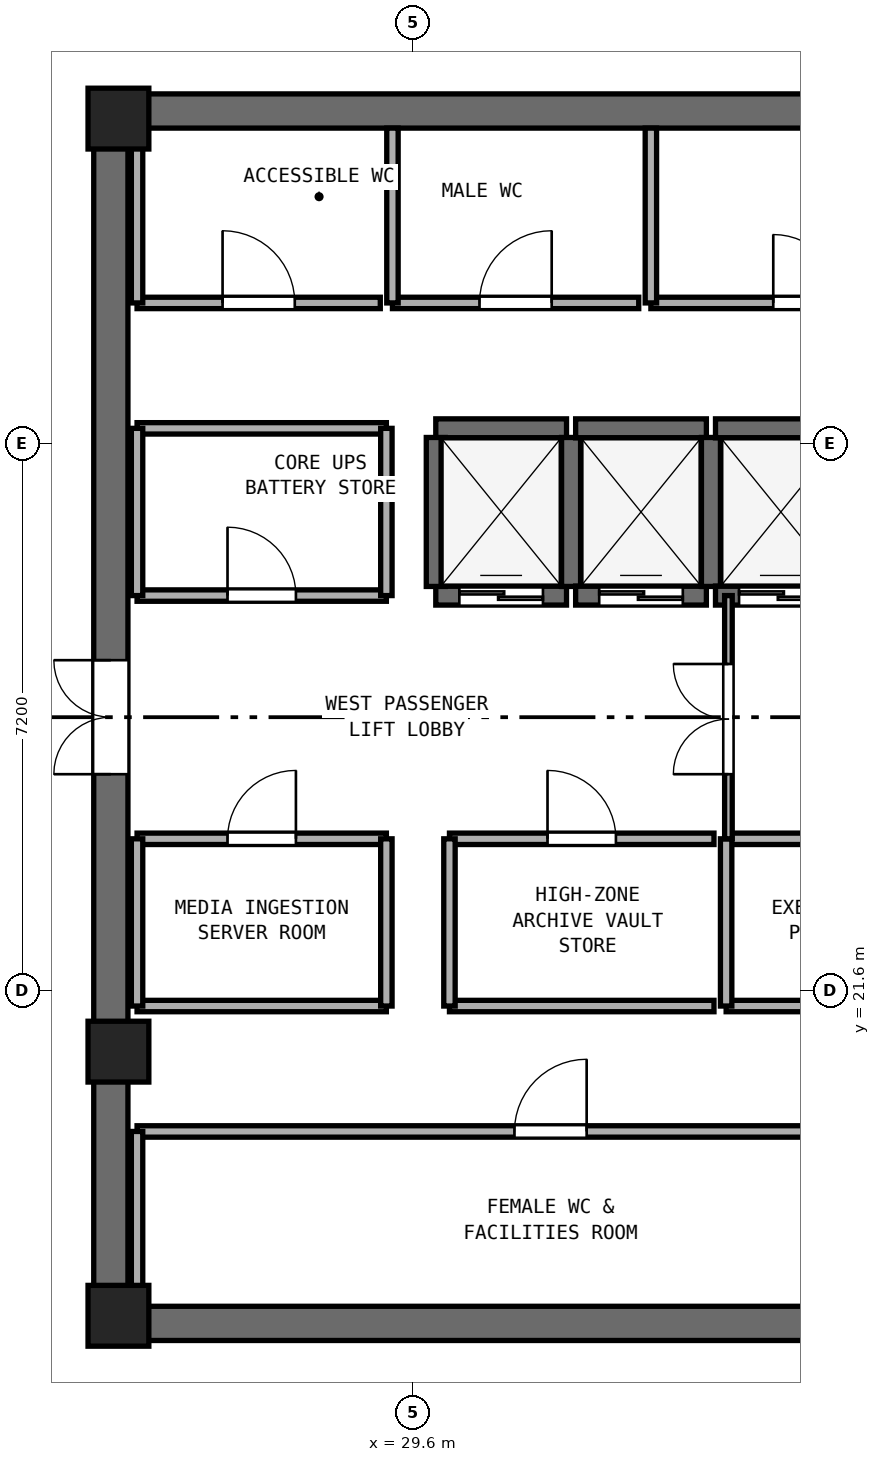
"""IFC4 building model, lengths in metres.
Left out: names, types, materials, properties, quantities, classifications, styles, units other than length and angle.
Written with IfcOpenShell. Run it as: python <this file> out.ifc"""

import sys

from ifc_helpers import new_model, si_unit, direction, frame, frame_2d, origin, origin_2d, place, context, subcontext, project, spatial, rectangle, extrude, element, fill, save


model = new_model("IFC4")
c1 = context("Model", 3, precision=1e-05, world=origin(), true_north=direction((0.0, 1.0)))
c2 = subcontext(c1, "Body", "Model", "MODEL_VIEW")
j1 = project(units=[si_unit("LENGTHUNIT", "METRE"), si_unit("PLANEANGLEUNIT", "RADIAN")], contexts=[c1])
p1 = place(None, origin())
s1 = spatial("IfcSite", under=j1, at=p1, CompositionType="ELEMENT")
p2 = place(p1, origin())
s2 = spatial("IfcBuilding", under=s1, at=p2, CompositionType="ELEMENT")
p3 = place(p2, frame((0.0, 0.0, 244.0)))
s3 = spatial("IfcBuildingStorey", under=s2, at=p3, CompositionType="ELEMENT", Elevation=244.0)
for number, where, z_axis, x_axis in (
    (1, (25.4, 17.225, 0.0), (0.0, 0.0, 1.0), (1.0, 0.0, 0.0)),
    (2, (25.4, 33.175, 0.0), (0.0, 0.0, 1.0), (1.0, 0.0, 0.0)),
):
    element("IfcWall", number, at=place(p3, frame(where, z_axis=z_axis, x_axis=x_axis)), inside=s3, PredefinedType="SHEAR", context=c2, shape_type="SweptSolid", body=[
        extrude(rectangle(XDim=23.2, YDim=0.45, at=frame_2d((11.6, 0.0))), origin(), (0.0, 0.0, 1.0), 3.51),
    ])
p4 = place(p3, frame((25.625, 17.45, 0.0), z_axis=(0.0, 0.0, 1.0), x_axis=(0.0, 1.0, 0.0)))
e3 = element("IfcWall", 3, at=p4, inside=s3, PredefinedType="SHEAR", context=c2, shape_type="SweptSolid", body=[
    extrude(rectangle(XDim=15.5, YDim=0.45, at=frame_2d((7.75, 0.0))), origin(), (0.0, 0.0, 1.0), 3.51),
])
p5 = place(p4, frame((7.0, 0.0, 0.0)))
e4 = element("IfcOpeningElement", 4, at=p5, cuts=e3, PredefinedType="OPENING", context=c2, shape_type="SweptSolid", body=[
    extrude(rectangle(XDim=1.5, YDim=2.15, at=frame_2d((0.75, 1.075))), frame((0.0, 0.235, 0.0), z_axis=(0.0, -1.0, 0.0), x_axis=(1.0, 0.0, 0.0)), (0.0, 0.0, 1.0), 0.47),
])
for number, where, z_axis, x_axis in (
    (5, (25.725, 17.325, 0.0), (0.0, 0.0, 1.0), (1.0, 0.0, 0.0)),
    (6, (25.725, 33.075, 0.0), (0.0, 0.0, 1.0), (1.0, 0.0, 0.0)),
    (7, (25.725, 20.8, 0.0), (0.0, 0.0, 1.0), (1.0, 0.0, 0.0)),
):
    element("IfcColumn", number, at=place(p3, frame(where, z_axis=z_axis, x_axis=x_axis)), inside=s3, PredefinedType="PILASTER", context=c2, shape_type="SweptSolid", body=[
        extrude(rectangle(XDim=0.8, YDim=0.8, at=origin_2d()), origin(), (0.0, 0.0, 1.0), 3.8),
    ])
p6 = place(p3, frame((29.9, 26.8, 0.0), z_axis=(0.0, 0.0, 1.0), x_axis=(1.0, 0.0, 0.0)))
e8 = element("IfcWall", 8, at=p6, inside=s3, PredefinedType="SHEAR", context=c2, shape_type="SweptSolid", body=[
    extrude(rectangle(XDim=1.72, YDim=0.25, at=frame_2d((0.86, 0.0))), origin(), (0.0, 0.0, 1.0), 3.51),
])
p7 = place(p6, frame((0.31, 0.0, 0.0)))
e9 = element("IfcOpeningElement", 9, at=p7, cuts=e8, PredefinedType="OPENING", context=c2, shape_type="SweptSolid", body=[
    extrude(rectangle(XDim=1.1, YDim=2.15, at=frame_2d((0.55, 1.075))), frame((0.0, 0.135, 0.0), z_axis=(0.0, -1.0, 0.0), x_axis=(1.0, 0.0, 0.0)), (0.0, 0.0, 1.0), 0.27),
])
p8 = place(p3, frame((29.9, 29.0, 0.0), z_axis=(0.0, 0.0, 1.0), x_axis=(1.0, 0.0, 0.0)))
e10 = element("IfcWall", 10, at=p8, inside=s3, PredefinedType="SHEAR", context=c2, shape_type="SweptSolid", body=[
    extrude(rectangle(XDim=1.72, YDim=0.25, at=frame_2d((0.86, 0.0))), origin(), (0.0, 0.0, 1.0), 3.51),
])
for number, where, z_axis, x_axis in (
    (11, (29.9, 26.92, 0.0), (0.0, 0.0, 1.0), (0.0, 1.0, 0.0)),
    (12, (31.68, 26.92, 0.0), (0.0, 0.0, 1.0), (0.0, 1.0, 0.0)),
):
    element("IfcWall", number, at=place(p3, frame(where, z_axis=z_axis, x_axis=x_axis)), inside=s3, PredefinedType="SHEAR", context=c2, shape_type="SweptSolid", body=[
        extrude(rectangle(XDim=1.96, YDim=0.25, at=frame_2d((0.98, 0.0))), origin(), (0.0, 0.0, 1.0), 3.51),
    ])
p9 = place(p3, frame((31.74, 26.8, 0.0), z_axis=(0.0, 0.0, 1.0), x_axis=(1.0, 0.0, 0.0)))
e13 = element("IfcWall", 13, at=p9, inside=s3, PredefinedType="SHEAR", context=c2, shape_type="SweptSolid", body=[
    extrude(rectangle(XDim=1.72, YDim=0.25, at=frame_2d((0.86, 0.0))), origin(), (0.0, 0.0, 1.0), 3.51),
])
p10 = place(p9, frame((0.31, 0.0, 0.0)))
e14 = element("IfcOpeningElement", 14, at=p10, cuts=e13, PredefinedType="OPENING", context=c2, shape_type="SweptSolid", body=[
    extrude(rectangle(XDim=1.1, YDim=2.15, at=frame_2d((0.55, 1.075))), frame((0.0, 0.135, 0.0), z_axis=(0.0, -1.0, 0.0), x_axis=(1.0, 0.0, 0.0)), (0.0, 0.0, 1.0), 0.27),
])
p11 = place(p3, frame((31.74, 29.0, 0.0), z_axis=(0.0, 0.0, 1.0), x_axis=(1.0, 0.0, 0.0)))
e15 = element("IfcWall", 15, at=p11, inside=s3, PredefinedType="SHEAR", context=c2, shape_type="SweptSolid", body=[
    extrude(rectangle(XDim=1.72, YDim=0.25, at=frame_2d((0.86, 0.0))), origin(), (0.0, 0.0, 1.0), 3.51),
])
p12 = place(p3, frame((33.52, 26.92, 0.0), z_axis=(0.0, 0.0, 1.0), x_axis=(0.0, 1.0, 0.0)))
e16 = element("IfcWall", 16, at=p12, inside=s3, PredefinedType="SHEAR", context=c2, shape_type="SweptSolid", body=[
    extrude(rectangle(XDim=1.96, YDim=0.25, at=frame_2d((0.98, 0.0))), origin(), (0.0, 0.0, 1.0), 3.51),
])
p13 = place(p3, frame((33.58, 26.8, 0.0), z_axis=(0.0, 0.0, 1.0), x_axis=(1.0, 0.0, 0.0)))
e17 = element("IfcWall", 17, at=p13, inside=s3, PredefinedType="SHEAR", context=c2, shape_type="SweptSolid", body=[
    extrude(rectangle(XDim=1.72, YDim=0.25, at=frame_2d((0.86, 0.0))), origin(), (0.0, 0.0, 1.0), 3.51),
])
p14 = place(p13, frame((0.31, 0.0, 0.0)))
e18 = element("IfcOpeningElement", 18, at=p14, cuts=e17, PredefinedType="OPENING", context=c2, shape_type="SweptSolid", body=[
    extrude(rectangle(XDim=1.1, YDim=2.15, at=frame_2d((0.55, 1.075))), frame((0.0, 0.135, 0.0), z_axis=(0.0, -1.0, 0.0), x_axis=(1.0, 0.0, 0.0)), (0.0, 0.0, 1.0), 0.27),
])
p15 = place(p3, frame((33.58, 29.0, 0.0), z_axis=(0.0, 0.0, 1.0), x_axis=(1.0, 0.0, 0.0)))
e19 = element("IfcWall", 19, at=p15, inside=s3, PredefinedType="SHEAR", context=c2, shape_type="SweptSolid", body=[
    extrude(rectangle(XDim=1.72, YDim=0.25, at=frame_2d((0.86, 0.0))), origin(), (0.0, 0.0, 1.0), 3.51),
])
p16 = place(p3, frame((25.97, 30.65, 0.0), z_axis=(0.0, 0.0, 1.0), x_axis=(1.0, 0.0, 0.0)))
e20 = element("IfcWall", 20, at=p16, inside=s3, PredefinedType="PARTITIONING", context=c2, shape_type="SweptSolid", body=[
    extrude(rectangle(XDim=3.2, YDim=0.15, at=frame_2d((1.6, 0.0))), origin(), (0.0, 0.0, 1.0), 3.51),
])
p17 = place(p16, frame((1.125, 0.0, 0.0)))
e21 = element("IfcOpeningElement", 21, at=p17, cuts=e20, PredefinedType="OPENING", context=c2, shape_type="SweptSolid", body=[
    extrude(rectangle(XDim=0.95, YDim=2.1, at=frame_2d((0.475, 1.05))), frame((0.0, 0.085, 0.0), z_axis=(0.0, -1.0, 0.0), x_axis=(1.0, 0.0, 0.0)), (0.0, 0.0, 1.0), 0.17),
])
p18 = place(p3, frame((25.97, 30.65, 0.0), z_axis=(0.0, 0.0, 1.0), x_axis=(0.0, 1.0, 0.0)))
e22 = element("IfcWall", 22, at=p18, inside=s3, PredefinedType="PARTITIONING", context=c2, shape_type="SweptSolid", body=[
    extrude(rectangle(XDim=2.3, YDim=0.15, at=frame_2d((1.15, 0.0))), origin(), (0.0, 0.0, 1.0), 2.61),
])
p19 = place(p3, frame((29.33, 30.65, 0.0), z_axis=(0.0, 0.0, 1.0), x_axis=(1.0, 0.0, 0.0)))
e23 = element("IfcWall", 23, at=p19, inside=s3, PredefinedType="PARTITIONING", context=c2, shape_type="SweptSolid", body=[
    extrude(rectangle(XDim=3.24, YDim=0.15, at=frame_2d((1.62, 0.0))), origin(), (0.0, 0.0, 1.0), 3.51),
])
p20 = place(p19, frame((1.145, 0.0, 0.0)))
e24 = element("IfcOpeningElement", 24, at=p20, cuts=e23, PredefinedType="OPENING", context=c2, shape_type="SweptSolid", body=[
    extrude(rectangle(XDim=0.95, YDim=2.1, at=frame_2d((0.475, 1.05))), frame((0.0, 0.085, 0.0), z_axis=(0.0, -1.0, 0.0), x_axis=(1.0, 0.0, 0.0)), (0.0, 0.0, 1.0), 0.17),
])
p21 = place(p3, frame((29.33, 30.65, 0.0), z_axis=(0.0, 0.0, 1.0), x_axis=(0.0, 1.0, 0.0)))
e25 = element("IfcWall", 25, at=p21, inside=s3, PredefinedType="PARTITIONING", context=c2, shape_type="SweptSolid", body=[
    extrude(rectangle(XDim=2.3, YDim=0.15, at=frame_2d((1.15, 0.0))), origin(), (0.0, 0.0, 1.0), 3.51),
])
p22 = place(p3, frame((32.73, 30.65, 0.0), z_axis=(0.0, 0.0, 1.0), x_axis=(1.0, 0.0, 0.0)))
e26 = element("IfcWall", 26, at=p22, inside=s3, PredefinedType="PARTITIONING", context=c2, shape_type="SweptSolid", body=[
    extrude(rectangle(XDim=4.12, YDim=0.15, at=frame_2d((2.06, 0.0))), origin(), (0.0, 0.0, 1.0), 3.51),
])
p23 = place(p22, frame((1.61, 0.0, 0.0)))
e27 = element("IfcOpeningElement", 27, at=p23, cuts=e26, PredefinedType="OPENING", context=c2, shape_type="SweptSolid", body=[
    extrude(rectangle(XDim=0.9, YDim=2.1, at=frame_2d((0.45, 1.05))), frame((0.0, 0.085, 0.0), z_axis=(0.0, -1.0, 0.0), x_axis=(1.0, 0.0, 0.0)), (0.0, 0.0, 1.0), 0.17),
])
p24 = place(p3, frame((32.73, 30.65, 0.0), z_axis=(0.0, 0.0, 1.0), x_axis=(0.0, 1.0, 0.0)))
e28 = element("IfcWall", 28, at=p24, inside=s3, PredefinedType="PARTITIONING", context=c2, shape_type="SweptSolid", body=[
    extrude(rectangle(XDim=2.3, YDim=0.15, at=frame_2d((1.15, 0.0))), origin(), (0.0, 0.0, 1.0), 3.51),
])
p25 = place(p3, frame((25.97, 19.75, 0.0), z_axis=(0.0, 0.0, 1.0), x_axis=(1.0, 0.0, 0.0)))
e29 = element("IfcWall", 29, at=p25, inside=s3, PredefinedType="PARTITIONING", context=c2, shape_type="SweptSolid", body=[
    extrude(rectangle(XDim=10.88, YDim=0.15, at=frame_2d((5.44, 0.0))), origin(), (0.0, 0.0, 1.0), 3.51),
])
p26 = place(p25, frame((4.965, 0.0, 0.0)))
e30 = element("IfcOpeningElement", 30, at=p26, cuts=e29, PredefinedType="OPENING", context=c2, shape_type="SweptSolid", body=[
    extrude(rectangle(XDim=0.95, YDim=2.1, at=frame_2d((0.475, 1.05))), frame((0.0, 0.085, 0.0), z_axis=(0.0, -1.0, 0.0), x_axis=(1.0, 0.0, 0.0)), (0.0, 0.0, 1.0), 0.17),
])
p27 = place(p3, frame((25.97, 17.45, 0.0), z_axis=(0.0, 0.0, 1.0), x_axis=(0.0, 1.0, 0.0)))
e31 = element("IfcWall", 31, at=p27, inside=s3, PredefinedType="PARTITIONING", context=c2, shape_type="SweptSolid", body=[
    extrude(rectangle(XDim=2.3, YDim=0.15, at=frame_2d((1.15, 0.0))), origin(), (0.0, 0.0, 1.0), 2.61),
])
p28 = place(p3, frame((25.97, 26.8, 0.0), z_axis=(0.0, 0.0, 1.0), x_axis=(1.0, 0.0, 0.0)))
e32 = element("IfcWall", 32, at=p28, inside=s3, PredefinedType="PARTITIONING", context=c2, shape_type="SweptSolid", body=[
    extrude(rectangle(XDim=3.28, YDim=0.15, at=frame_2d((1.64, 0.0))), origin(), (0.0, 0.0, 1.0), 3.51),
])
p29 = place(p28, frame((1.19, 0.0, 0.0)))
e33 = element("IfcOpeningElement", 33, at=p29, cuts=e32, PredefinedType="OPENING", context=c2, shape_type="SweptSolid", body=[
    extrude(rectangle(XDim=0.9, YDim=2.1, at=frame_2d((0.45, 1.05))), frame((0.0, 0.085, 0.0), z_axis=(0.0, -1.0, 0.0), x_axis=(1.0, 0.0, 0.0)), (0.0, 0.0, 1.0), 0.17),
])
p30 = place(p3, frame((25.97, 29.0, 0.0), z_axis=(0.0, 0.0, 1.0), x_axis=(1.0, 0.0, 0.0)))
e34 = element("IfcWall", 34, at=p30, inside=s3, PredefinedType="PARTITIONING", context=c2, shape_type="SweptSolid", body=[
    extrude(rectangle(XDim=3.28, YDim=0.15, at=frame_2d((1.64, 0.0))), origin(), (0.0, 0.0, 1.0), 3.51),
])
p31 = place(p3, frame((25.97, 26.8, 0.0), z_axis=(0.0, 0.0, 1.0), x_axis=(0.0, 1.0, 0.0)))
e35 = element("IfcWall", 35, at=p31, inside=s3, PredefinedType="PARTITIONING", context=c2, shape_type="SweptSolid", body=[
    extrude(rectangle(XDim=2.2, YDim=0.15, at=frame_2d((1.1, 0.0))), origin(), (0.0, 0.0, 1.0), 2.61),
])
p32 = place(p3, frame((29.25, 26.8, 0.0), z_axis=(0.0, 0.0, 1.0), x_axis=(0.0, 1.0, 0.0)))
e36 = element("IfcWall", 36, at=p32, inside=s3, PredefinedType="PARTITIONING", context=c2, shape_type="SweptSolid", body=[
    extrude(rectangle(XDim=2.2, YDim=0.15, at=frame_2d((1.1, 0.0))), origin(), (0.0, 0.0, 1.0), 3.51),
])
p33 = place(p3, frame((25.97, 21.4, 0.0), z_axis=(0.0, 0.0, 1.0), x_axis=(1.0, 0.0, 0.0)))
e37 = element("IfcWall", 37, at=p33, inside=s3, PredefinedType="PARTITIONING", context=c2, shape_type="SweptSolid", body=[
    extrude(rectangle(XDim=3.28, YDim=0.15, at=frame_2d((1.64, 0.0))), origin(), (0.0, 0.0, 1.0), 3.51),
])
p34 = place(p3, frame((25.97, 23.6, 0.0), z_axis=(0.0, 0.0, 1.0), x_axis=(1.0, 0.0, 0.0)))
e38 = element("IfcWall", 38, at=p34, inside=s3, PredefinedType="PARTITIONING", context=c2, shape_type="SweptSolid", body=[
    extrude(rectangle(XDim=3.28, YDim=0.15, at=frame_2d((1.64, 0.0))), origin(), (0.0, 0.0, 1.0), 3.51),
])
p35 = place(p34, frame((1.19, 0.0, 0.0)))
e39 = element("IfcOpeningElement", 39, at=p35, cuts=e38, PredefinedType="OPENING", context=c2, shape_type="SweptSolid", body=[
    extrude(rectangle(XDim=0.9, YDim=2.1, at=frame_2d((0.45, 1.05))), frame((0.0, 0.085, 0.0), z_axis=(0.0, -1.0, 0.0), x_axis=(1.0, 0.0, 0.0)), (0.0, 0.0, 1.0), 0.17),
])
p36 = place(p3, frame((25.97, 21.4, 0.0), z_axis=(0.0, 0.0, 1.0), x_axis=(0.0, 1.0, 0.0)))
e40 = element("IfcWall", 40, at=p36, inside=s3, PredefinedType="PARTITIONING", context=c2, shape_type="SweptSolid", body=[
    extrude(rectangle(XDim=2.2, YDim=0.15, at=frame_2d((1.1, 0.0))), origin(), (0.0, 0.0, 1.0), 2.61),
])
p37 = place(p3, frame((29.25, 21.4, 0.0), z_axis=(0.0, 0.0, 1.0), x_axis=(0.0, 1.0, 0.0)))
e41 = element("IfcWall", 41, at=p37, inside=s3, PredefinedType="PARTITIONING", context=c2, shape_type="SweptSolid", body=[
    extrude(rectangle(XDim=2.2, YDim=0.15, at=frame_2d((1.1, 0.0))), origin(), (0.0, 0.0, 1.0), 3.51),
])
p38 = place(p3, frame((30.08, 21.4, 0.0), z_axis=(0.0, 0.0, 1.0), x_axis=(1.0, 0.0, 0.0)))
e42 = element("IfcWall", 42, at=p38, inside=s3, PredefinedType="PARTITIONING", context=c2, shape_type="SweptSolid", body=[
    extrude(rectangle(XDim=3.48, YDim=0.15, at=frame_2d((1.74, 0.0))), origin(), (0.0, 0.0, 1.0), 3.51),
])
p39 = place(p3, frame((30.08, 23.6, 0.0), z_axis=(0.0, 0.0, 1.0), x_axis=(1.0, 0.0, 0.0)))
e43 = element("IfcWall", 43, at=p39, inside=s3, PredefinedType="PARTITIONING", context=c2, shape_type="SweptSolid", body=[
    extrude(rectangle(XDim=3.48, YDim=0.15, at=frame_2d((1.74, 0.0))), origin(), (0.0, 0.0, 1.0), 3.51),
])
p40 = place(p39, frame((1.29, 0.0, 0.0)))
e44 = element("IfcOpeningElement", 44, at=p40, cuts=e43, PredefinedType="OPENING", context=c2, shape_type="SweptSolid", body=[
    extrude(rectangle(XDim=0.9, YDim=2.1, at=frame_2d((0.45, 1.05))), frame((0.0, 0.085, 0.0), z_axis=(0.0, -1.0, 0.0), x_axis=(1.0, 0.0, 0.0)), (0.0, 0.0, 1.0), 0.17),
])
p41 = place(p3, frame((30.08, 21.4, 0.0), z_axis=(0.0, 0.0, 1.0), x_axis=(0.0, 1.0, 0.0)))
e45 = element("IfcWall", 45, at=p41, inside=s3, PredefinedType="PARTITIONING", context=c2, shape_type="SweptSolid", body=[
    extrude(rectangle(XDim=2.2, YDim=0.15, at=frame_2d((1.1, 0.0))), origin(), (0.0, 0.0, 1.0), 3.51),
])
p42 = place(p3, frame((33.72, 21.4, 0.0), z_axis=(0.0, 0.0, 1.0), x_axis=(1.0, 0.0, 0.0)))
e46 = element("IfcWall", 46, at=p42, inside=s3, PredefinedType="PARTITIONING", context=c2, shape_type="SweptSolid", body=[
    extrude(rectangle(XDim=3.48, YDim=0.15, at=frame_2d((1.74, 0.0))), origin(), (0.0, 0.0, 1.0), 3.51),
])
p43 = place(p3, frame((33.72, 23.6, 0.0), z_axis=(0.0, 0.0, 1.0), x_axis=(1.0, 0.0, 0.0)))
e47 = element("IfcWall", 47, at=p43, inside=s3, PredefinedType="PARTITIONING", context=c2, shape_type="SweptSolid", body=[
    extrude(rectangle(XDim=3.48, YDim=0.15, at=frame_2d((1.74, 0.0))), origin(), (0.0, 0.0, 1.0), 3.51),
])
p44 = place(p43, frame((1.29, 0.0, 0.0)))
e48 = element("IfcOpeningElement", 48, at=p44, cuts=e47, PredefinedType="OPENING", context=c2, shape_type="SweptSolid", body=[
    extrude(rectangle(XDim=0.9, YDim=2.1, at=frame_2d((0.45, 1.05))), frame((0.0, 0.085, 0.0), z_axis=(0.0, -1.0, 0.0), x_axis=(1.0, 0.0, 0.0)), (0.0, 0.0, 1.0), 0.17),
])
p45 = place(p3, frame((33.72, 21.4, 0.0), z_axis=(0.0, 0.0, 1.0), x_axis=(0.0, 1.0, 0.0)))
e49 = element("IfcWall", 49, at=p45, inside=s3, PredefinedType="PARTITIONING", context=c2, shape_type="SweptSolid", body=[
    extrude(rectangle(XDim=2.2, YDim=0.15, at=frame_2d((1.1, 0.0))), origin(), (0.0, 0.0, 1.0), 3.51),
])
p46 = place(p3, frame((33.75, 23.6, 0.0), z_axis=(0.0, 0.0, 1.0), x_axis=(0.0, 1.0, 0.0)))
e50 = element("IfcWall", 50, at=p46, inside=s3, PredefinedType="PARTITIONING", context=c2, shape_type="SweptSolid", body=[
    extrude(rectangle(XDim=3.2, YDim=0.1, at=frame_2d((1.6, 0.0))), origin(), (0.0, 0.0, 1.0), 3.51),
])
p47 = place(p46, frame((0.85, 0.0, 0.0)))
e51 = element("IfcOpeningElement", 51, at=p47, cuts=e50, PredefinedType="OPENING", context=c2, shape_type="SweptSolid", body=[
    extrude(rectangle(XDim=1.45, YDim=2.12, at=frame_2d((0.725, 1.06))), frame((0.0, 0.06, 0.0), z_axis=(0.0, -1.0, 0.0), x_axis=(1.0, 0.0, 0.0)), (0.0, 0.0, 1.0), 0.12),
])
p48 = place(p7, origin())
e52 = element("IfcDoor", 52, at=p48, inside=s3, OperationType="DOUBLE_DOOR_SLIDING", PredefinedType="DOOR", context=c2, shape_type="SweptSolid", body=[
    extrude(rectangle(XDim=1.1, YDim=2.15, at=frame_2d((0.55, 1.075))), frame((0.0, 0.025, 0.0), z_axis=(0.0, -1.0, 0.0), x_axis=(1.0, 0.0, 0.0)), (0.0, 0.0, 1.0), 0.05),
])
fill(e9, e52)
p49 = place(p10, origin())
e53 = element("IfcDoor", 53, at=p49, inside=s3, OperationType="DOUBLE_DOOR_SLIDING", PredefinedType="DOOR", context=c2, shape_type="SweptSolid", body=[
    extrude(rectangle(XDim=1.1, YDim=2.15, at=frame_2d((0.55, 1.075))), frame((0.0, 0.025, 0.0), z_axis=(0.0, -1.0, 0.0), x_axis=(1.0, 0.0, 0.0)), (0.0, 0.0, 1.0), 0.05),
])
fill(e14, e53)
p50 = place(p14, origin())
e54 = element("IfcDoor", 54, at=p50, inside=s3, OperationType="DOUBLE_DOOR_SLIDING", PredefinedType="DOOR", context=c2, shape_type="SweptSolid", body=[
    extrude(rectangle(XDim=1.1, YDim=2.15, at=frame_2d((0.55, 1.075))), frame((0.0, 0.025, 0.0), z_axis=(0.0, -1.0, 0.0), x_axis=(1.0, 0.0, 0.0)), (0.0, 0.0, 1.0), 0.05),
])
fill(e18, e54)
p51 = place(p5, origin())
e55 = element("IfcDoor", 55, at=p51, inside=s3, OperationType="DOUBLE_DOOR_SINGLE_SWING", PredefinedType="DOOR", context=c2, shape_type="SweptSolid", body=[
    extrude(rectangle(XDim=1.5, YDim=2.15, at=frame_2d((0.75, 1.075))), frame((0.0, 0.025, 0.0), z_axis=(0.0, -1.0, 0.0), x_axis=(1.0, 0.0, 0.0)), (0.0, 0.0, 1.0), 0.05),
])
fill(e4, e55)
p52 = place(p17, origin())
e56 = element("IfcDoor", 56, at=p52, inside=s3, OperationType="SINGLE_SWING_LEFT", PredefinedType="DOOR", context=c2, shape_type="SweptSolid", body=[
    extrude(rectangle(XDim=0.95, YDim=2.1, at=frame_2d((0.475, 1.05))), frame((0.0, 0.025, 0.0), z_axis=(0.0, -1.0, 0.0), x_axis=(1.0, 0.0, 0.0)), (0.0, 0.0, 1.0), 0.05),
])
fill(e21, e56)
p53 = place(p20, origin())
e57 = element("IfcDoor", 57, at=p53, inside=s3, OperationType="SINGLE_SWING_RIGHT", PredefinedType="DOOR", context=c2, shape_type="SweptSolid", body=[
    extrude(rectangle(XDim=0.95, YDim=2.1, at=frame_2d((0.475, 1.05))), frame((0.0, 0.025, 0.0), z_axis=(0.0, -1.0, 0.0), x_axis=(1.0, 0.0, 0.0)), (0.0, 0.0, 1.0), 0.05),
])
fill(e24, e57)
p54 = place(p23, origin())
e58 = element("IfcDoor", 58, at=p54, inside=s3, OperationType="SINGLE_SWING_LEFT", PredefinedType="DOOR", context=c2, shape_type="SweptSolid", body=[
    extrude(rectangle(XDim=0.9, YDim=2.1, at=frame_2d((0.45, 1.05))), frame((0.0, 0.025, 0.0), z_axis=(0.0, -1.0, 0.0), x_axis=(1.0, 0.0, 0.0)), (0.0, 0.0, 1.0), 0.05),
])
fill(e27, e58)
p55 = place(p26, origin())
e59 = element("IfcDoor", 59, at=p55, inside=s3, OperationType="SINGLE_SWING_RIGHT", PredefinedType="DOOR", context=c2, shape_type="SweptSolid", body=[
    extrude(rectangle(XDim=0.95, YDim=2.1, at=frame_2d((0.475, 1.05))), frame((0.0, 0.025, 0.0), z_axis=(0.0, -1.0, 0.0), x_axis=(1.0, 0.0, 0.0)), (0.0, 0.0, 1.0), 0.05),
])
fill(e30, e59)
p56 = place(p29, origin())
e60 = element("IfcDoor", 60, at=p56, inside=s3, OperationType="SINGLE_SWING_LEFT", PredefinedType="DOOR", context=c2, shape_type="SweptSolid", body=[
    extrude(rectangle(XDim=0.9, YDim=2.1, at=frame_2d((0.45, 1.05))), frame((0.0, 0.025, 0.0), z_axis=(0.0, -1.0, 0.0), x_axis=(1.0, 0.0, 0.0)), (0.0, 0.0, 1.0), 0.05),
])
fill(e33, e60)
p57 = place(p35, origin())
e61 = element("IfcDoor", 61, at=p57, inside=s3, OperationType="SINGLE_SWING_RIGHT", PredefinedType="DOOR", context=c2, shape_type="SweptSolid", body=[
    extrude(rectangle(XDim=0.9, YDim=2.1, at=frame_2d((0.45, 1.05))), frame((0.0, 0.025, 0.0), z_axis=(0.0, -1.0, 0.0), x_axis=(1.0, 0.0, 0.0)), (0.0, 0.0, 1.0), 0.05),
])
fill(e39, e61)
p58 = place(p40, origin())
e62 = element("IfcDoor", 62, at=p58, inside=s3, OperationType="SINGLE_SWING_LEFT", PredefinedType="DOOR", context=c2, shape_type="SweptSolid", body=[
    extrude(rectangle(XDim=0.9, YDim=2.1, at=frame_2d((0.45, 1.05))), frame((0.0, 0.025, 0.0), z_axis=(0.0, -1.0, 0.0), x_axis=(1.0, 0.0, 0.0)), (0.0, 0.0, 1.0), 0.05),
])
fill(e44, e62)
p59 = place(p47, origin())
e63 = element("IfcDoor", 63, at=p59, inside=s3, OperationType="DOUBLE_DOOR_SINGLE_SWING", PredefinedType="DOOR", context=c2, shape_type="SweptSolid", body=[
    extrude(rectangle(XDim=1.45, YDim=2.12, at=frame_2d((0.725, 1.06))), frame((0.0, 0.025, 0.0), z_axis=(0.0, -1.0, 0.0), x_axis=(1.0, 0.0, 0.0)), (0.0, 0.0, 1.0), 0.05),
])
fill(e51, e63)
save(model, sys.argv[1])
